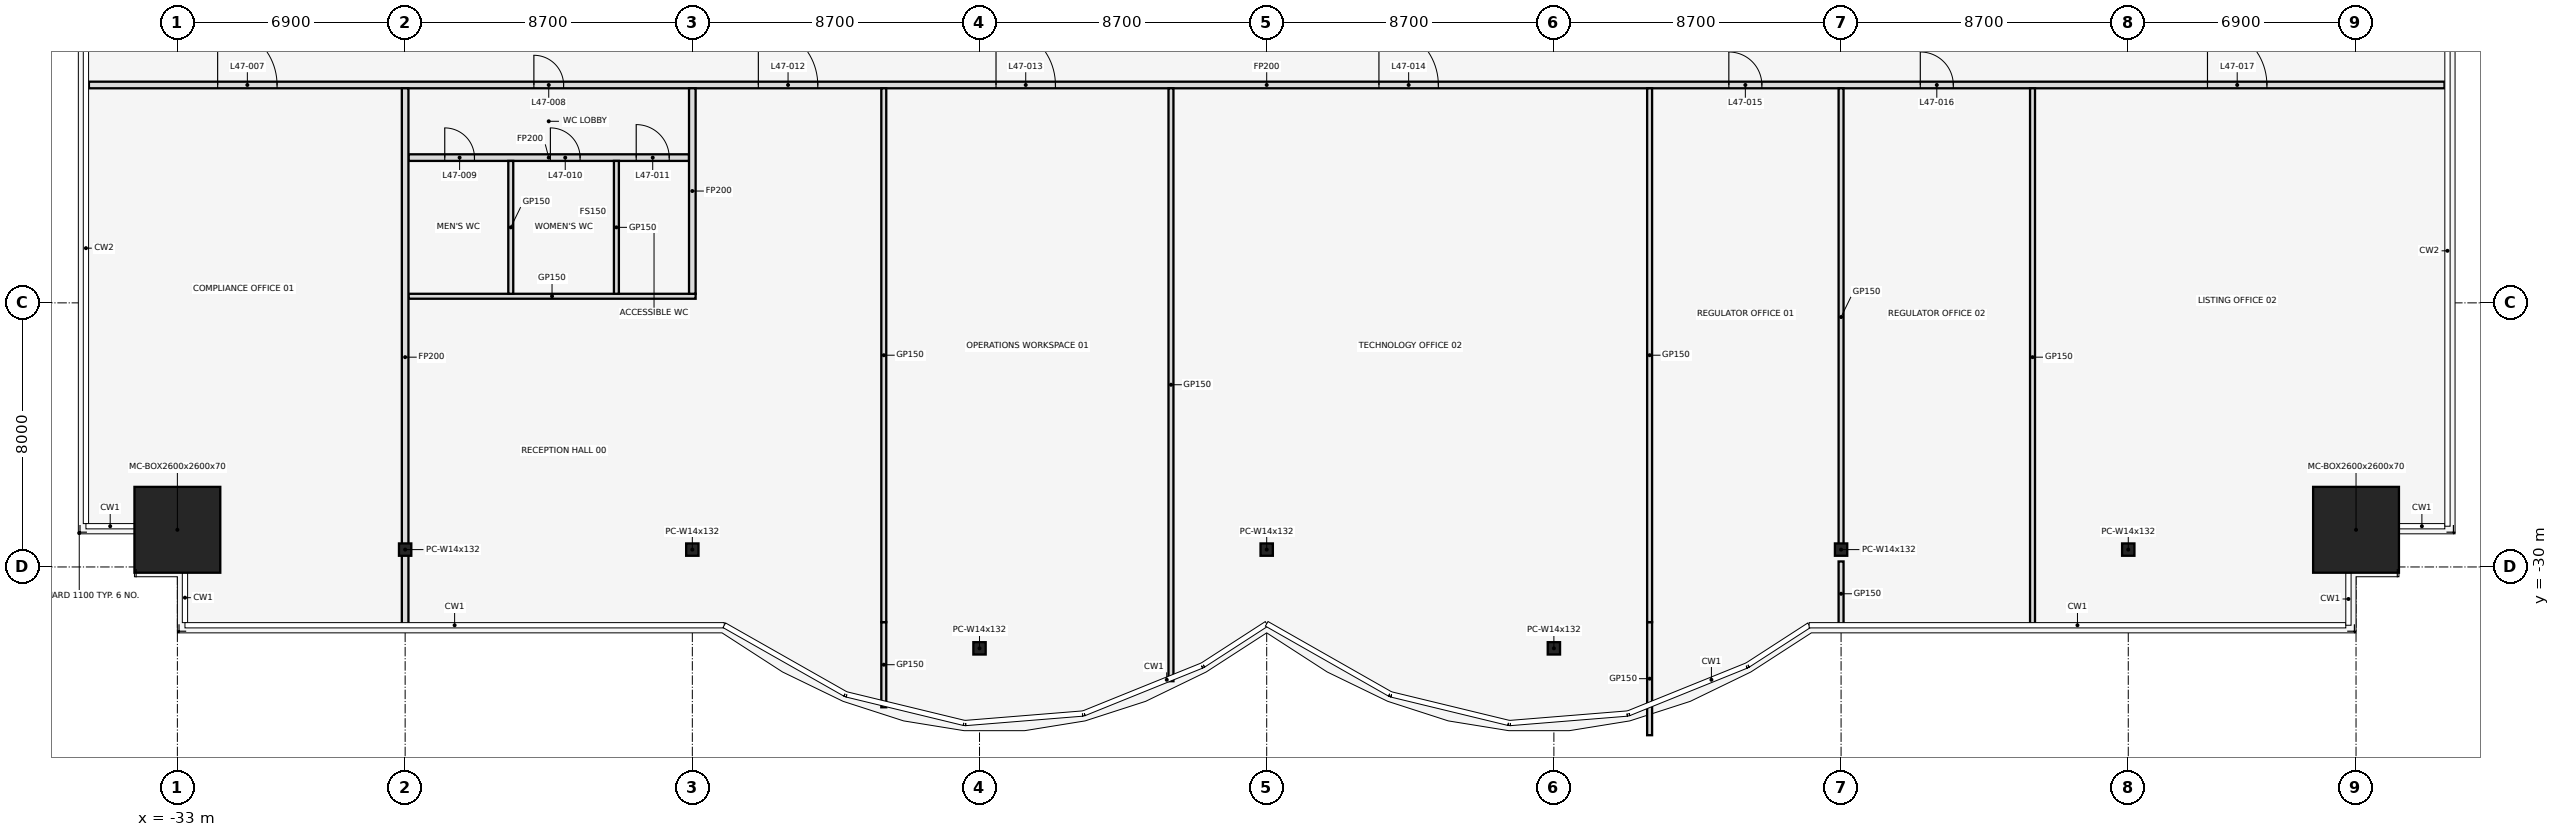
"""IFC4 building model, lengths in metres.
Left out: names, types, materials, properties, quantities, classifications, styles, units other than length and angle.
Written with IfcOpenShell. Run it as: python <this file> out.ifc"""

import sys

from ifc_helpers import new_model, si_unit, direction, frame, frame_2d, origin, origin_2d, place, context, subcontext, project, spatial, rectangle, hollow_rectangle, i_section, extrude, element, fill, save


model = new_model("IFC4")
c1 = context("Model", 3, precision=1e-05, world=origin(), true_north=direction((0.0, 1.0)))
c2 = subcontext(c1, "Body", "Model", "MODEL_VIEW")
j1 = project(units=[si_unit("LENGTHUNIT", "METRE"), si_unit("PLANEANGLEUNIT", "RADIAN")], contexts=[c1])
p1 = place(None, origin())
s1 = spatial("IfcSite", under=j1, at=p1, CompositionType="ELEMENT")
p2 = place(p1, origin())
s2 = spatial("IfcBuilding", under=s1, at=p2, CompositionType="ELEMENT")
p3 = place(p2, frame((0.0, 0.0, 211.4)))
s3 = spatial("IfcBuildingStorey", under=s2, at=p3, CompositionType="ELEMENT", Elevation=211.4)
p4 = place(p3, frame((-33.0, -28.874, 0.0), z_axis=(0.0, 0.0, 1.0), x_axis=(1.0, 0.0, 0.0)))
e1 = element("IfcColumn", 1, at=p4, inside=s3, PredefinedType="COLUMN", context=c2, shape_type="SweptSolid", body=[
    extrude(hollow_rectangle(XDim=2.6, YDim=2.6, WallThickness=0.07, at=origin_2d()), origin(), (0.0, 0.0, 1.0), 4.1),
])
for number, where, z_axis, x_axis in (
    (2, (-26.1, -29.474, 0.0), (0.0, 0.0, 1.0), (1.0, 0.0, 0.0)),
    (3, (-17.4, -29.474, 0.0), (0.0, 0.0, 1.0), (1.0, 0.0, 0.0)),
    (4, (-8.7, -32.465, 0.0), (0.0, 0.0, 1.0), (1.0, 0.0, 0.0)),
    (5, (0.0, -29.474, 0.0), (0.0, 0.0, 1.0), (1.0, 0.0, 0.0)),
    (6, (8.7, -32.465, 0.0), (0.0, 0.0, 1.0), (1.0, 0.0, 0.0)),
    (7, (17.4, -29.474, 0.0), (0.0, 0.0, 1.0), (1.0, 0.0, 0.0)),
    (8, (26.1, -29.474, 0.0), (0.0, 0.0, 1.0), (1.0, 0.0, 0.0)),
):
    element("IfcColumn", number, at=place(p3, frame(where, z_axis=z_axis, x_axis=x_axis)), inside=s3, PredefinedType="COLUMN", context=c2, shape_type="SweptSolid", body=[
        extrude(i_section(OverallWidth=0.373, OverallDepth=0.373, WebThickness=0.016, FlangeThickness=0.026, at=origin_2d()), origin(), (0.0, 0.0, 1.0), 4.1),
    ])
p5 = place(p3, frame((33.0, -28.874, 0.0), z_axis=(0.0, 0.0, 1.0), x_axis=(1.0, 0.0, 0.0)))
e9 = element("IfcColumn", 9, at=p5, inside=s3, PredefinedType="COLUMN", context=c2, shape_type="SweptSolid", body=[
    extrude(hollow_rectangle(XDim=2.6, YDim=2.6, WallThickness=0.07, at=origin_2d()), origin(), (0.0, 0.0, 1.0), 4.1),
])
p6 = place(p3, frame((-26.0, -21.8, 0.0), z_axis=(0.0, 0.0, 1.0), x_axis=(1.0, 0.0, 0.0)))
e10 = element("IfcWall", 10, at=p6, inside=s3, PredefinedType="PARTITIONING", context=c2, shape_type="SweptSolid", body=[
    extrude(rectangle(XDim=8.7, YDim=0.15, at=frame_2d((4.35, 0.0))), origin(), (0.0, 0.0, 1.0), 2.841),
])
p7 = place(p3, frame((-26.0, -17.6, 0.0), z_axis=(0.0, 0.0, 1.0), x_axis=(1.0, 0.0, 0.0)))
e11 = element("IfcWall", 11, at=p7, inside=s3, PredefinedType="PARTITIONING", context=c2, shape_type="SweptSolid", body=[
    extrude(rectangle(XDim=8.5, YDim=0.2, at=frame_2d((4.25, 0.0))), origin(), (0.0, 0.0, 1.0), 2.841),
])
p8 = place(p7, frame((1.1, 0.0, 0.0)))
e12 = element("IfcOpeningElement", 12, at=p8, cuts=e11, PredefinedType="OPENING", context=c2, shape_type="SweptSolid", body=[
    extrude(rectangle(XDim=0.9, YDim=2.1, at=frame_2d((0.45, 1.05))), frame((0.0, 0.112, 0.0), z_axis=(0.0, -1.0, 0.0), x_axis=(1.0, 0.0, 0.0)), (0.0, 0.0, 1.0), 0.224),
])
p9 = place(p7, frame((4.3, 0.0, 0.0)))
e13 = element("IfcOpeningElement", 13, at=p9, cuts=e11, PredefinedType="OPENING", context=c2, shape_type="SweptSolid", body=[
    extrude(rectangle(XDim=0.9, YDim=2.1, at=frame_2d((0.45, 1.05))), frame((0.0, 0.112, 0.0), z_axis=(0.0, -1.0, 0.0), x_axis=(1.0, 0.0, 0.0)), (0.0, 0.0, 1.0), 0.224),
])
p10 = place(p7, frame((6.9, 0.0, 0.0)))
e14 = element("IfcOpeningElement", 14, at=p10, cuts=e11, PredefinedType="OPENING", context=c2, shape_type="SweptSolid", body=[
    extrude(rectangle(XDim=1.0, YDim=2.1, at=frame_2d((0.5, 1.05))), frame((0.0, 0.112, 0.0), z_axis=(0.0, -1.0, 0.0), x_axis=(1.0, 0.0, 0.0)), (0.0, 0.0, 1.0), 0.224),
])
p11 = place(p3, frame((-35.68, -15.4, 0.0), z_axis=(0.0, 0.0, 1.0), x_axis=(1.0, 0.0, 0.0)))
e15 = element("IfcWall", 15, at=p11, inside=s3, PredefinedType="PARTITIONING", context=c2, shape_type="SweptSolid", body=[
    extrude(rectangle(XDim=71.36, YDim=0.2, at=frame_2d((35.68, 0.0))), origin(), (0.0, 0.0, 1.0), 2.841),
])
p12 = place(p11, frame((3.9, 0.0, 0.0)))
e16 = element("IfcOpeningElement", 16, at=p12, cuts=e15, PredefinedType="OPENING", context=c2, shape_type="SweptSolid", body=[
    extrude(rectangle(XDim=1.8, YDim=2.1, at=frame_2d((0.9, 1.05))), frame((0.0, 0.112, 0.0), z_axis=(0.0, -1.0, 0.0), x_axis=(1.0, 0.0, 0.0)), (0.0, 0.0, 1.0), 0.224),
])
p13 = place(p11, frame((13.48, 0.0, 0.0)))
e17 = element("IfcOpeningElement", 17, at=p13, cuts=e15, PredefinedType="OPENING", context=c2, shape_type="SweptSolid", body=[
    extrude(rectangle(XDim=0.9, YDim=2.1, at=frame_2d((0.45, 1.05))), frame((0.0, 0.112, 0.0), z_axis=(0.0, -1.0, 0.0), x_axis=(1.0, 0.0, 0.0)), (0.0, 0.0, 1.0), 0.224),
])
p14 = place(p11, frame((20.28, 0.0, 0.0)))
e18 = element("IfcOpeningElement", 18, at=p14, cuts=e15, PredefinedType="OPENING", context=c2, shape_type="SweptSolid", body=[
    extrude(rectangle(XDim=1.8, YDim=2.1, at=frame_2d((0.9, 1.05))), frame((0.0, 0.112, 0.0), z_axis=(0.0, -1.0, 0.0), x_axis=(1.0, 0.0, 0.0)), (0.0, 0.0, 1.0), 0.224),
])
p15 = place(p11, frame((27.48, 0.0, 0.0)))
e19 = element("IfcOpeningElement", 19, at=p15, cuts=e15, PredefinedType="OPENING", context=c2, shape_type="SweptSolid", body=[
    extrude(rectangle(XDim=1.8, YDim=2.1, at=frame_2d((0.9, 1.05))), frame((0.0, 0.112, 0.0), z_axis=(0.0, -1.0, 0.0), x_axis=(1.0, 0.0, 0.0)), (0.0, 0.0, 1.0), 0.224),
])
p16 = place(p11, frame((39.08, 0.0, 0.0)))
e20 = element("IfcOpeningElement", 20, at=p16, cuts=e15, PredefinedType="OPENING", context=c2, shape_type="SweptSolid", body=[
    extrude(rectangle(XDim=1.8, YDim=2.1, at=frame_2d((0.9, 1.05))), frame((0.0, 0.112, 0.0), z_axis=(0.0, -1.0, 0.0), x_axis=(1.0, 0.0, 0.0)), (0.0, 0.0, 1.0), 0.224),
])
p17 = place(p11, frame((49.68, 0.0, 0.0)))
e21 = element("IfcOpeningElement", 21, at=p17, cuts=e15, PredefinedType="OPENING", context=c2, shape_type="SweptSolid", body=[
    extrude(rectangle(XDim=1.0, YDim=2.1, at=frame_2d((0.5, 1.05))), frame((0.0, 0.112, 0.0), z_axis=(0.0, -1.0, 0.0), x_axis=(1.0, 0.0, 0.0)), (0.0, 0.0, 1.0), 0.224),
])
p18 = place(p11, frame((55.48, 0.0, 0.0)))
e22 = element("IfcOpeningElement", 22, at=p18, cuts=e15, PredefinedType="OPENING", context=c2, shape_type="SweptSolid", body=[
    extrude(rectangle(XDim=1.0, YDim=2.1, at=frame_2d((0.5, 1.05))), frame((0.0, 0.112, 0.0), z_axis=(0.0, -1.0, 0.0), x_axis=(1.0, 0.0, 0.0)), (0.0, 0.0, 1.0), 0.224),
])
p19 = place(p11, frame((64.18, 0.0, 0.0)))
e23 = element("IfcOpeningElement", 23, at=p19, cuts=e15, PredefinedType="OPENING", context=c2, shape_type="SweptSolid", body=[
    extrude(rectangle(XDim=1.8, YDim=2.1, at=frame_2d((0.9, 1.05))), frame((0.0, 0.112, 0.0), z_axis=(0.0, -1.0, 0.0), x_axis=(1.0, 0.0, 0.0)), (0.0, 0.0, 1.0), 0.224),
])
p20 = place(p3, frame((-26.1, -31.79, 0.0), z_axis=(0.0, 0.0, 1.0), x_axis=(0.0, 1.0, 0.0)))
e24 = element("IfcWall", 24, at=p20, inside=s3, PredefinedType="PARTITIONING", context=c2, shape_type="SweptSolid", body=[
    extrude(rectangle(XDim=16.29, YDim=0.2, at=frame_2d((8.145, 0.0))), origin(), (0.0, 0.0, 1.0), 2.841),
])
for number, where, z_axis, x_axis in (
    (25, (-22.9, -21.725, 0.0), (0.0, 0.0, 1.0), (0.0, 1.0, 0.0)),
    (26, (-19.7, -21.725, 0.0), (0.0, 0.0, 1.0), (0.0, 1.0, 0.0)),
):
    element("IfcWall", number, at=place(p3, frame(where, z_axis=z_axis, x_axis=x_axis)), inside=s3, PredefinedType="PARTITIONING", context=c2, shape_type="SweptSolid", body=[
        extrude(rectangle(XDim=4.025, YDim=0.15, at=frame_2d((2.013, 0.0))), origin(), (0.0, 0.0, 1.0), 2.841),
    ])
p21 = place(p3, frame((-17.4, -21.725, 0.0), z_axis=(0.0, 0.0, 1.0), x_axis=(0.0, 1.0, 0.0)))
e27 = element("IfcWall", 27, at=p21, inside=s3, PredefinedType="PARTITIONING", context=c2, shape_type="SweptSolid", body=[
    extrude(rectangle(XDim=6.225, YDim=0.2, at=frame_2d((3.113, 0.0))), origin(), (0.0, 0.0, 1.0), 2.841),
])
p22 = place(p3, frame((-11.6, -34.25, 0.0), z_axis=(0.0, 0.0, 1.0), x_axis=(0.0, 1.0, 0.0)))
e28 = element("IfcWall", 28, at=p22, inside=s3, PredefinedType="PARTITIONING", context=c2, shape_type="SweptSolid", body=[
    extrude(rectangle(XDim=2.579, YDim=0.15, at=frame_2d((1.29, 0.0))), origin(), (0.0, 0.0, 1.0), 2.841),
])
p23 = place(p3, frame((-11.6, -31.671, 0.0), z_axis=(0.0, 0.0, 1.0), x_axis=(0.0, 1.0, 0.0)))
e29 = element("IfcWall", 29, at=p23, inside=s3, PredefinedType="PARTITIONING", context=c2, shape_type="SweptSolid", body=[
    extrude(rectangle(XDim=16.171, YDim=0.15, at=frame_2d((8.085, 0.0))), origin(), (0.0, 0.0, 1.0), 2.841),
])
p24 = place(p3, frame((-2.9, -33.46, 0.0), z_axis=(0.0, 0.0, 1.0), x_axis=(0.0, 1.0, 0.0)))
e30 = element("IfcWall", 30, at=p24, inside=s3, PredefinedType="PARTITIONING", context=c2, shape_type="SweptSolid", body=[
    extrude(rectangle(XDim=17.96, YDim=0.15, at=frame_2d((8.98, 0.0))), origin(), (0.0, 0.0, 1.0), 2.841),
])
p25 = place(p3, frame((11.6, -35.096, 0.0), z_axis=(0.0, 0.0, 1.0), x_axis=(0.0, 1.0, 0.0)))
e31 = element("IfcWall", 31, at=p25, inside=s3, PredefinedType="PARTITIONING", context=c2, shape_type="SweptSolid", body=[
    extrude(rectangle(XDim=3.425, YDim=0.15, at=frame_2d((1.712, 0.0))), origin(), (0.0, 0.0, 1.0), 2.841),
])
p26 = place(p3, frame((11.6, -31.671, 0.0), z_axis=(0.0, 0.0, 1.0), x_axis=(0.0, 1.0, 0.0)))
e32 = element("IfcWall", 32, at=p26, inside=s3, PredefinedType="PARTITIONING", context=c2, shape_type="SweptSolid", body=[
    extrude(rectangle(XDim=16.171, YDim=0.15, at=frame_2d((8.085, 0.0))), origin(), (0.0, 0.0, 1.0), 2.841),
])
p27 = place(p3, frame((17.4, -31.79, 0.0), z_axis=(0.0, 0.0, 1.0), x_axis=(0.0, 1.0, 0.0)))
e33 = element("IfcWall", 33, at=p27, inside=s3, PredefinedType="PARTITIONING", context=c2, shape_type="SweptSolid", body=[
    extrude(rectangle(XDim=1.957, YDim=0.15, at=frame_2d((0.979, 0.0))), origin(), (0.0, 0.0, 1.0), 2.841),
])
p28 = place(p3, frame((17.4, -29.359, 0.0), z_axis=(0.0, 0.0, 1.0), x_axis=(0.0, 1.0, 0.0)))
e34 = element("IfcWall", 34, at=p28, inside=s3, PredefinedType="PARTITIONING", context=c2, shape_type="SweptSolid", body=[
    extrude(rectangle(XDim=13.859, YDim=0.15, at=frame_2d((6.929, 0.0))), origin(), (0.0, 0.0, 1.0), 2.841),
])
p29 = place(p3, frame((23.2, -31.79, 0.0), z_axis=(0.0, 0.0, 1.0), x_axis=(0.0, 1.0, 0.0)))
e35 = element("IfcWall", 35, at=p29, inside=s3, PredefinedType="PARTITIONING", context=c2, shape_type="SweptSolid", body=[
    extrude(rectangle(XDim=16.29, YDim=0.15, at=frame_2d((8.145, 0.0))), origin(), (0.0, 0.0, 1.0), 2.841),
])
p30 = place(p12, origin())
e36 = element("IfcDoor", 36, at=p30, inside=s3, OperationType="SINGLE_SWING_LEFT", PredefinedType="DOOR", context=c2, shape_type="SweptSolid", body=[
    extrude(rectangle(XDim=1.8, YDim=2.1, at=frame_2d((0.9, 1.05))), frame((0.0, 0.025, 0.0), z_axis=(0.0, -1.0, 0.0), x_axis=(1.0, 0.0, 0.0)), (0.0, 0.0, 1.0), 0.05),
])
fill(e16, e36)
p31 = place(p13, frame((0.9, 0.0, 0.0), z_axis=(0.0, 0.0, 1.0), x_axis=(-1.0, 0.0, 0.0)))
e37 = element("IfcDoor", 37, at=p31, inside=s3, OperationType="SINGLE_SWING_RIGHT", PredefinedType="DOOR", context=c2, shape_type="SweptSolid", body=[
    extrude(rectangle(XDim=0.9, YDim=2.1, at=frame_2d((0.45, 1.05))), frame((0.0, 0.025, 0.0), z_axis=(0.0, -1.0, 0.0), x_axis=(1.0, 0.0, 0.0)), (0.0, 0.0, 1.0), 0.05),
])
fill(e17, e37)
p32 = place(p8, frame((0.9, 0.0, 0.0), z_axis=(0.0, 0.0, 1.0), x_axis=(-1.0, 0.0, 0.0)))
e38 = element("IfcDoor", 38, at=p32, inside=s3, OperationType="SINGLE_SWING_RIGHT", PredefinedType="DOOR", context=c2, shape_type="SweptSolid", body=[
    extrude(rectangle(XDim=0.9, YDim=2.1, at=frame_2d((0.45, 1.05))), frame((0.0, 0.025, 0.0), z_axis=(0.0, -1.0, 0.0), x_axis=(1.0, 0.0, 0.0)), (0.0, 0.0, 1.0), 0.05),
])
fill(e12, e38)
p33 = place(p9, frame((0.9, 0.0, 0.0), z_axis=(0.0, 0.0, 1.0), x_axis=(-1.0, 0.0, 0.0)))
e39 = element("IfcDoor", 39, at=p33, inside=s3, OperationType="SINGLE_SWING_LEFT", PredefinedType="DOOR", context=c2, shape_type="SweptSolid", body=[
    extrude(rectangle(XDim=0.9, YDim=2.1, at=frame_2d((0.45, 1.05))), frame((0.0, 0.025, 0.0), z_axis=(0.0, -1.0, 0.0), x_axis=(1.0, 0.0, 0.0)), (0.0, 0.0, 1.0), 0.05),
])
fill(e13, e39)
p34 = place(p10, frame((1.0, 0.0, 0.0), z_axis=(0.0, 0.0, 1.0), x_axis=(-1.0, 0.0, 0.0)))
e40 = element("IfcDoor", 40, at=p34, inside=s3, OperationType="SINGLE_SWING_RIGHT", PredefinedType="DOOR", context=c2, shape_type="SweptSolid", body=[
    extrude(rectangle(XDim=1.0, YDim=2.1, at=frame_2d((0.5, 1.05))), frame((0.0, 0.025, 0.0), z_axis=(0.0, -1.0, 0.0), x_axis=(1.0, 0.0, 0.0)), (0.0, 0.0, 1.0), 0.05),
])
fill(e14, e40)
p35 = place(p14, origin())
e41 = element("IfcDoor", 41, at=p35, inside=s3, OperationType="SINGLE_SWING_LEFT", PredefinedType="DOOR", context=c2, shape_type="SweptSolid", body=[
    extrude(rectangle(XDim=1.8, YDim=2.1, at=frame_2d((0.9, 1.05))), frame((0.0, 0.025, 0.0), z_axis=(0.0, -1.0, 0.0), x_axis=(1.0, 0.0, 0.0)), (0.0, 0.0, 1.0), 0.05),
])
fill(e18, e41)
p36 = place(p15, origin())
e42 = element("IfcDoor", 42, at=p36, inside=s3, OperationType="SINGLE_SWING_LEFT", PredefinedType="DOOR", context=c2, shape_type="SweptSolid", body=[
    extrude(rectangle(XDim=1.8, YDim=2.1, at=frame_2d((0.9, 1.05))), frame((0.0, 0.025, 0.0), z_axis=(0.0, -1.0, 0.0), x_axis=(1.0, 0.0, 0.0)), (0.0, 0.0, 1.0), 0.05),
])
fill(e19, e42)
p37 = place(p16, origin())
e43 = element("IfcDoor", 43, at=p37, inside=s3, OperationType="SINGLE_SWING_LEFT", PredefinedType="DOOR", context=c2, shape_type="SweptSolid", body=[
    extrude(rectangle(XDim=1.8, YDim=2.1, at=frame_2d((0.9, 1.05))), frame((0.0, 0.025, 0.0), z_axis=(0.0, -1.0, 0.0), x_axis=(1.0, 0.0, 0.0)), (0.0, 0.0, 1.0), 0.05),
])
fill(e20, e43)
p38 = place(p17, frame((1.0, 0.0, 0.0), z_axis=(0.0, 0.0, 1.0), x_axis=(-1.0, 0.0, 0.0)))
e44 = element("IfcDoor", 44, at=p38, inside=s3, OperationType="SINGLE_SWING_RIGHT", PredefinedType="DOOR", context=c2, shape_type="SweptSolid", body=[
    extrude(rectangle(XDim=1.0, YDim=2.1, at=frame_2d((0.5, 1.05))), frame((0.0, 0.025, 0.0), z_axis=(0.0, -1.0, 0.0), x_axis=(1.0, 0.0, 0.0)), (0.0, 0.0, 1.0), 0.05),
])
fill(e21, e44)
p39 = place(p18, frame((1.0, 0.0, 0.0), z_axis=(0.0, 0.0, 1.0), x_axis=(-1.0, 0.0, 0.0)))
e45 = element("IfcDoor", 45, at=p39, inside=s3, OperationType="SINGLE_SWING_LEFT", PredefinedType="DOOR", context=c2, shape_type="SweptSolid", body=[
    extrude(rectangle(XDim=1.0, YDim=2.1, at=frame_2d((0.5, 1.05))), frame((0.0, 0.025, 0.0), z_axis=(0.0, -1.0, 0.0), x_axis=(1.0, 0.0, 0.0)), (0.0, 0.0, 1.0), 0.05),
])
fill(e22, e45)
p40 = place(p19, origin())
e46 = element("IfcDoor", 46, at=p40, inside=s3, OperationType="SINGLE_SWING_LEFT", PredefinedType="DOOR", context=c2, shape_type="SweptSolid", body=[
    extrude(rectangle(XDim=1.8, YDim=2.1, at=frame_2d((0.9, 1.05))), frame((0.0, 0.025, 0.0), z_axis=(0.0, -1.0, 0.0), x_axis=(1.0, 0.0, 0.0)), (0.0, 0.0, 1.0), 0.05),
])
fill(e23, e46)
save(model, sys.argv[1])
